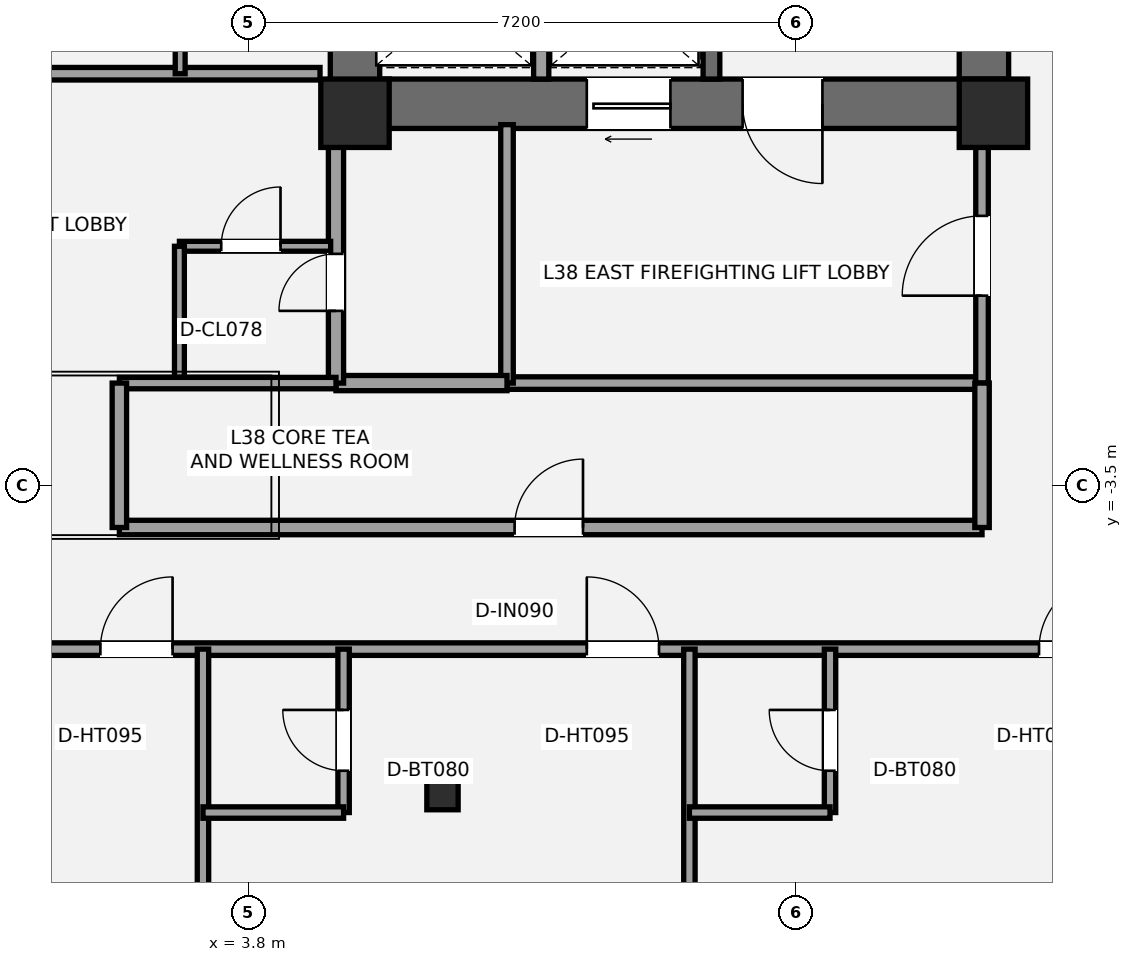
"""IFC4 building model, lengths in metres.
Left out: names, types, materials, properties, quantities, classifications, styles, units other than length and angle.
Written with IfcOpenShell. Run it as: python <this file> out.ifc"""

import sys

from ifc_helpers import new_model, si_unit, direction, frame, frame_2d, origin, origin_2d, place, context, subcontext, project, spatial, rectangle, i_section, extrude, element, fill, save


model = new_model("IFC4")
c1 = context("Model", 3, precision=1e-05, world=origin(), true_north=direction((0.0, 1.0)))
c2 = subcontext(c1, "Body", "Model", "MODEL_VIEW")
j1 = project(units=[si_unit("LENGTHUNIT", "METRE"), si_unit("PLANEANGLEUNIT", "RADIAN")], contexts=[c1])
p1 = place(None, origin())
s1 = spatial("IfcSite", under=j1, at=p1, CompositionType="ELEMENT")
p2 = place(p1, origin())
s2 = spatial("IfcBuilding", under=s1, at=p2, CompositionType="ELEMENT")
p3 = place(p2, frame((0.0, 0.0, 143.8)))
s3 = spatial("IfcBuildingStorey", under=s2, at=p3, CompositionType="ELEMENT", Elevation=143.8)
p4 = place(p3, frame((13.475, 1.2, 0.0), z_axis=(0.0, 0.0, 1.0), x_axis=(0.0, 1.0, 0.0)))
e1 = element("IfcWall", 1, at=p4, inside=s3, PredefinedType="SHEAR", context=c2, shape_type="SweptSolid", body=[
    extrude(rectangle(XDim=8.45, YDim=0.65, at=frame_2d((4.225, 0.0))), origin(), (0.0, 0.0, 1.0), 3.2),
])
p5 = place(p3, frame((13.8, 1.525, 0.0), z_axis=(0.0, 0.0, 1.0), x_axis=(-1.0, 0.0, 0.0)))
e2 = element("IfcWall", 2, at=p5, inside=s3, PredefinedType="SHEAR", context=c2, shape_type="SweptSolid", body=[
    extrude(rectangle(XDim=8.925, YDim=0.65, at=frame_2d((4.462, 0.0))), origin(), (0.0, 0.0, 1.0), 3.2),
])
p6 = place(p5, frame((2.45, 0.0, 0.0)))
e3 = element("IfcOpeningElement", 3, at=p6, cuts=e2, PredefinedType="OPENING", context=c2, shape_type="SweptSolid", body=[
    extrude(rectangle(XDim=1.05, YDim=2.15, at=frame_2d((0.525, 1.075))), frame((0.0, 0.335, 0.0), z_axis=(0.0, -1.0, 0.0), x_axis=(1.0, 0.0, 0.0)), (0.0, 0.0, 1.0), 0.67),
])
p7 = place(p5, frame((4.45, 0.0, 0.0)))
e4 = element("IfcOpeningElement", 4, at=p7, cuts=e2, PredefinedType="OPENING", context=c2, shape_type="SweptSolid", body=[
    extrude(rectangle(XDim=1.1, YDim=2.2, at=frame_2d((0.55, 1.1))), frame((0.0, 0.335, 0.0), z_axis=(0.0, -1.0, 0.0), x_axis=(1.0, 0.0, 0.0)), (0.0, 0.0, 1.0), 0.67),
])
p8 = place(p3, frame((5.2, 1.2, 0.0), z_axis=(0.0, 0.0, 1.0), x_axis=(0.0, 1.0, 0.0)))
e5 = element("IfcWall", 5, at=p8, inside=s3, PredefinedType="SHEAR", context=c2, shape_type="SweptSolid", body=[
    extrude(rectangle(XDim=2.6, YDim=0.65, at=frame_2d((1.3, 0.0))), origin(), (0.0, 0.0, 1.0), 3.2),
])
p9 = place(p3, frame((9.89, 1.85, 0.0), z_axis=(0.0, 0.0, 1.0), x_axis=(0.0, 1.0, 0.0)))
e6 = element("IfcWall", 6, at=p9, inside=s3, PredefinedType="SHEAR", context=c2, shape_type="SweptSolid", body=[
    extrude(rectangle(XDim=7.15, YDim=0.22, at=frame_2d((3.575, 0.0))), origin(), (0.0, 0.0, 1.0), 3.2),
])
for number, where, z_axis, x_axis in (
    (7, (5.2, 1.4, 0.0), (0.0, 0.0, 1.0), (1.0, 0.0, 0.0)),
    (8, (13.6, 1.4, 0.0), (0.0, 0.0, 1.0), (1.0, 0.0, 0.0)),
):
    element("IfcColumn", number, at=place(p3, frame(where, z_axis=z_axis, x_axis=x_axis)), inside=s3, PredefinedType="COLUMN", context=c2, shape_type="SweptSolid", body=[
        extrude(rectangle(XDim=0.9, YDim=0.9, at=origin_2d()), origin(), (0.0, 0.0, 1.0), 3.2),
    ])
p10 = place(p3, frame((6.351, -7.546, 0.0), z_axis=(0.0, 0.0, 1.0), x_axis=(1.0, 0.0, 0.0)))
e9 = element("IfcColumn", 9, at=p10, inside=s3, PredefinedType="COLUMN", context=c2, shape_type="SweptSolid", body=[
    extrude(i_section(OverallWidth=0.412, OverallDepth=0.435, WebThickness=0.036, FlangeThickness=0.057, at=origin_2d()), origin(), (0.0, 0.0, 1.0), 3.2),
])
p11 = place(p3, frame((7.2, -2.15, 0.0), z_axis=(0.0, 0.0, 1.0), x_axis=(1.0, 0.0, 0.0)))
e10 = element("IfcWall", 10, at=p11, inside=s3, PredefinedType="PARTITIONING", context=c2, shape_type="SweptSolid", body=[
    extrude(rectangle(XDim=6.25, YDim=0.165, at=frame_2d((3.125, 0.0))), origin(), (0.0, 0.0, 1.0), 3.02),
])
p12 = place(p3, frame((7.2, -2.15, 0.0), z_axis=(0.0, 0.0, 1.0), x_axis=(0.0, 1.0, 0.0)))
e11 = element("IfcWall", 11, at=p12, inside=s3, PredefinedType="PARTITIONING", context=c2, shape_type="SweptSolid", body=[
    extrude(rectangle(XDim=3.4, YDim=0.165, at=frame_2d((1.7, 0.0))), origin(), (0.0, 0.0, 1.0), 2.473),
])
p13 = place(p3, frame((13.45, -2.15, 0.0), z_axis=(0.0, 0.0, 1.0), x_axis=(0.0, 1.0, 0.0)))
e12 = element("IfcWall", 12, at=p13, inside=s3, PredefinedType="PARTITIONING", context=c2, shape_type="SweptSolid", body=[
    extrude(rectangle(XDim=3.4, YDim=0.165, at=frame_2d((1.7, 0.0))), origin(), (0.0, 0.0, 1.0), 2.473),
])
p14 = place(p13, frame((1.15, 0.0, 0.0)))
e13 = element("IfcOpeningElement", 13, at=p14, cuts=e12, PredefinedType="OPENING", context=c2, shape_type="SweptSolid", body=[
    extrude(rectangle(XDim=1.05, YDim=2.15, at=frame_2d((0.525, 1.075))), frame((0.0, 0.093, 0.0), z_axis=(0.0, -1.0, 0.0), x_axis=(1.0, 0.0, 0.0)), (0.0, 0.0, 1.0), 0.185),
])
p15 = place(p3, frame((4.95, -2.15, 0.0), z_axis=(0.0, 0.0, 1.0), x_axis=(1.0, 0.0, 0.0)))
e14 = element("IfcWall", 14, at=p15, inside=s3, PredefinedType="SOLIDWALL", context=c2, shape_type="SweptSolid", body=[
    extrude(rectangle(XDim=2.25, YDim=0.2, at=frame_2d((1.125, 0.0))), origin(), (0.0, 0.0, 1.0), 3.02),
])
p16 = place(p3, frame((4.95, -2.15, 0.0), z_axis=(0.0, 0.0, 1.0), x_axis=(0.0, 1.0, 0.0)))
e15 = element("IfcWall", 15, at=p16, inside=s3, PredefinedType="SOLIDWALL", context=c2, shape_type="SweptSolid", body=[
    extrude(rectangle(XDim=3.4, YDim=0.2, at=frame_2d((1.7, 0.0))), origin(), (0.0, 0.0, 1.0), 2.473),
])
p17 = place(p16, frame((0.95, 0.0, 0.0)))
e16 = element("IfcOpeningElement", 16, at=p17, cuts=e15, PredefinedType="OPENING", context=c2, shape_type="SweptSolid", body=[
    extrude(rectangle(XDim=0.75, YDim=2.1, at=frame_2d((0.375, 1.05))), frame((0.0, 0.11, 0.0), z_axis=(0.0, -1.0, 0.0), x_axis=(1.0, 0.0, 0.0)), (0.0, 0.0, 1.0), 0.22),
])
p18 = place(p3, frame((2.89, -0.35, 0.0), z_axis=(0.0, 0.0, 1.0), x_axis=(1.0, 0.0, 0.0)))
e17 = element("IfcWall", 17, at=p18, inside=s3, PredefinedType="PARTITIONING", context=c2, shape_type="SweptSolid", body=[
    extrude(rectangle(XDim=1.99, YDim=0.13, at=frame_2d((0.995, 0.0))), origin(), (0.0, 0.0, 1.0), 3.02),
])
p19 = place(p18, frame((0.55, 0.0, 0.0)))
e18 = element("IfcOpeningElement", 18, at=p19, cuts=e17, PredefinedType="OPENING", context=c2, shape_type="SweptSolid", body=[
    extrude(rectangle(XDim=0.78, YDim=2.1, at=frame_2d((0.39, 1.05))), frame((0.0, 0.075, 0.0), z_axis=(0.0, -1.0, 0.0), x_axis=(1.0, 0.0, 0.0)), (0.0, 0.0, 1.0), 0.15),
])
p20 = place(p3, frame((2.89, -2.15, 0.0), z_axis=(0.0, 0.0, 1.0), x_axis=(0.0, 1.0, 0.0)))
e19 = element("IfcWall", 19, at=p20, inside=s3, PredefinedType="PARTITIONING", context=c2, shape_type="SweptSolid", body=[
    extrude(rectangle(XDim=1.8, YDim=0.13, at=frame_2d((0.9, 0.0))), origin(), (0.0, 0.0, 1.0), 3.02),
])
p21 = place(p3, frame((7.65, 1.85, 0.0), z_axis=(0.0, 0.0, 1.0), x_axis=(0.0, 1.0, 0.0)))
e20 = element("IfcWall", 20, at=p21, inside=s3, PredefinedType="SOLIDWALL", context=c2, shape_type="SweptSolid", body=[
    extrude(rectangle(XDim=1.97, YDim=0.2, at=frame_2d((0.985, 0.0))), origin(), (0.0, 0.0, 1.0), 3.02),
])
p22 = place(p3, frame((0.85, 1.92, 0.0), z_axis=(0.0, 0.0, 1.0), x_axis=(1.0, 0.0, 0.0)))
e21 = element("IfcWall", 21, at=p22, inside=s3, PredefinedType="PARTITIONING", context=c2, shape_type="SweptSolid", body=[
    extrude(rectangle(XDim=3.89, YDim=0.165, at=frame_2d((1.945, 0.0))), origin(), (0.0, 0.0, 1.0), 2.16),
])
p23 = place(p3, frame((2.9, 1.92, 0.0), z_axis=(0.0, 0.0, 1.0), x_axis=(0.0, 1.0, 0.0)))
e22 = element("IfcWall", 22, at=p23, inside=s3, PredefinedType="PARTITIONING", context=c2, shape_type="SweptSolid", body=[
    extrude(rectangle(XDim=1.82, YDim=0.13, at=frame_2d((0.91, 0.0))), origin(), (0.0, 0.0, 1.0), 3.02),
])
p24 = place(p3, frame((2.1, -4.05, 0.0), z_axis=(0.0, 0.0, 1.0), x_axis=(1.0, 0.0, 0.0)))
e23 = element("IfcWall", 23, at=p24, inside=s3, PredefinedType="PLUMBINGWALL", context=c2, shape_type="SweptSolid", body=[
    extrude(rectangle(XDim=11.35, YDim=0.19, at=frame_2d((5.675, 0.0))), origin(), (0.0, 0.0, 1.0), 2.555),
])
p25 = place(p24, frame((5.2, 0.0, 0.0)))
e24 = element("IfcOpeningElement", 24, at=p25, cuts=e23, PredefinedType="OPENING", context=c2, shape_type="SweptSolid", body=[
    extrude(rectangle(XDim=0.9, YDim=2.1, at=frame_2d((0.45, 1.05))), frame((0.0, 0.105, 0.0), z_axis=(0.0, -1.0, 0.0), x_axis=(1.0, 0.0, 0.0)), (0.0, 0.0, 1.0), 0.21),
])
p26 = place(p3, frame((2.1, -2.15, 0.0), z_axis=(0.0, 0.0, 1.0), x_axis=(1.0, 0.0, 0.0)))
e25 = element("IfcWall", 25, at=p26, inside=s3, PredefinedType="PLUMBINGWALL", context=c2, shape_type="SweptSolid", body=[
    extrude(rectangle(XDim=2.85, YDim=0.15, at=frame_2d((1.425, 0.0))), origin(), (0.0, 0.0, 1.0), 3.02),
])
p27 = place(p3, frame((2.1, -4.05, 0.0), z_axis=(0.0, 0.0, 1.0), x_axis=(0.0, 1.0, 0.0)))
e26 = element("IfcWall", 26, at=p27, inside=s3, PredefinedType="PLUMBINGWALL", context=c2, shape_type="SweptSolid", body=[
    extrude(rectangle(XDim=1.9, YDim=0.19, at=frame_2d((0.95, 0.0))), origin(), (0.0, 0.0, 1.0), 3.02),
])
p28 = place(p3, frame((13.45, -4.05, 0.0), z_axis=(0.0, 0.0, 1.0), x_axis=(0.0, 1.0, 0.0)))
e27 = element("IfcWall", 27, at=p28, inside=s3, PredefinedType="PLUMBINGWALL", context=c2, shape_type="SweptSolid", body=[
    extrude(rectangle(XDim=1.9, YDim=0.19, at=frame_2d((0.95, 0.0))), origin(), (0.0, 0.0, 1.0), 2.473),
])
p29 = place(p3, frame((-15.55, -5.65, 0.0), z_axis=(0.0, 0.0, 1.0), x_axis=(1.0, 0.0, 0.0)))
e28 = element("IfcWall", 28, at=p29, inside=s3, PredefinedType="PARTITIONING", context=c2, shape_type="SweptSolid", body=[
    extrude(rectangle(XDim=31.1, YDim=0.165, at=frame_2d((15.55, 0.0))), origin(), (0.0, 0.0, 1.0), 2.398),
])
p30 = place(p29, frame((4.6, 0.0, 0.0)))
e29 = element("IfcOpeningElement", 29, at=p30, cuts=e28, PredefinedType="OPENING", context=c2, shape_type="SweptSolid", body=[
    extrude(rectangle(XDim=0.95, YDim=2.15, at=frame_2d((0.475, 1.075))), frame((0.0, 0.093, 0.0), z_axis=(0.0, -1.0, 0.0), x_axis=(1.0, 0.0, 0.0)), (0.0, 0.0, 1.0), 0.185),
])
p31 = place(p29, frame((11.0, 0.0, 0.0)))
e30 = element("IfcOpeningElement", 30, at=p31, cuts=e28, PredefinedType="OPENING", context=c2, shape_type="SweptSolid", body=[
    extrude(rectangle(XDim=0.95, YDim=2.15, at=frame_2d((0.475, 1.075))), frame((0.0, 0.093, 0.0), z_axis=(0.0, -1.0, 0.0), x_axis=(1.0, 0.0, 0.0)), (0.0, 0.0, 1.0), 0.185),
])
p32 = place(p29, frame((17.4, 0.0, 0.0)))
e31 = element("IfcOpeningElement", 31, at=p32, cuts=e28, PredefinedType="OPENING", context=c2, shape_type="SweptSolid", body=[
    extrude(rectangle(XDim=0.95, YDim=2.15, at=frame_2d((0.475, 1.075))), frame((0.0, 0.093, 0.0), z_axis=(0.0, -1.0, 0.0), x_axis=(1.0, 0.0, 0.0)), (0.0, 0.0, 1.0), 0.185),
])
p33 = place(p29, frame((23.8, 0.0, 0.0)))
e32 = element("IfcOpeningElement", 32, at=p33, cuts=e28, PredefinedType="OPENING", context=c2, shape_type="SweptSolid", body=[
    extrude(rectangle(XDim=0.95, YDim=2.15, at=frame_2d((0.475, 1.075))), frame((0.0, 0.093, 0.0), z_axis=(0.0, -1.0, 0.0), x_axis=(1.0, 0.0, 0.0)), (0.0, 0.0, 1.0), 0.185),
])
p34 = place(p29, frame((29.75, 0.0, 0.0)))
e33 = element("IfcOpeningElement", 33, at=p34, cuts=e28, PredefinedType="OPENING", context=c2, shape_type="SweptSolid", body=[
    extrude(rectangle(XDim=0.95, YDim=2.15, at=frame_2d((0.475, 1.075))), frame((0.0, 0.093, 0.0), z_axis=(0.0, -1.0, 0.0), x_axis=(1.0, 0.0, 0.0)), (0.0, 0.0, 1.0), 0.185),
])
p35 = place(p3, frame((3.2, -16.205, 0.0), z_axis=(0.0, 0.0, 1.0), x_axis=(0.0, 1.0, 0.0)))
e34 = element("IfcWall", 34, at=p35, inside=s3, PredefinedType="PLUMBINGWALL", context=c2, shape_type="SweptSolid", body=[
    extrude(rectangle(XDim=10.555, YDim=0.15, at=frame_2d((5.278, 0.0))), origin(), (0.0, 0.0, 1.0), 2.473),
])
p36 = place(p3, frame((9.6, -15.591, 0.0), z_axis=(0.0, 0.0, 1.0), x_axis=(0.0, 1.0, 0.0)))
e35 = element("IfcWall", 35, at=p36, inside=s3, PredefinedType="PLUMBINGWALL", context=c2, shape_type="SweptSolid", body=[
    extrude(rectangle(XDim=9.941, YDim=0.15, at=frame_2d((4.97, 0.0))), origin(), (0.0, 0.0, 1.0), 3.02),
])
p37 = place(p3, frame((5.05, -7.8, 0.0), z_axis=(0.0, 0.0, 1.0), x_axis=(0.0, 1.0, 0.0)))
e36 = element("IfcWall", 36, at=p37, inside=s3, PredefinedType="PLUMBINGWALL", context=c2, shape_type="SweptSolid", body=[
    extrude(rectangle(XDim=2.15, YDim=0.15, at=frame_2d((1.075, 0.0))), origin(), (0.0, 0.0, 1.0), 3.02),
])
p38 = place(p37, frame((0.55, 0.0, 0.0)))
e37 = element("IfcOpeningElement", 37, at=p38, cuts=e36, PredefinedType="OPENING", context=c2, shape_type="SweptSolid", body=[
    extrude(rectangle(XDim=0.8, YDim=2.1, at=frame_2d((0.4, 1.05))), frame((0.0, 0.085, 0.0), z_axis=(0.0, -1.0, 0.0), x_axis=(1.0, 0.0, 0.0)), (0.0, 0.0, 1.0), 0.17),
])
p39 = place(p3, frame((3.2, -7.8, 0.0), z_axis=(0.0, 0.0, 1.0), x_axis=(1.0, 0.0, 0.0)))
e38 = element("IfcWall", 38, at=p39, inside=s3, PredefinedType="PLUMBINGWALL", context=c2, shape_type="SweptSolid", body=[
    extrude(rectangle(XDim=1.85, YDim=0.15, at=frame_2d((0.925, 0.0))), origin(), (0.0, 0.0, 1.0), 3.02),
])
p40 = place(p3, frame((11.45, -7.8, 0.0), z_axis=(0.0, 0.0, 1.0), x_axis=(0.0, 1.0, 0.0)))
e39 = element("IfcWall", 39, at=p40, inside=s3, PredefinedType="PLUMBINGWALL", context=c2, shape_type="SweptSolid", body=[
    extrude(rectangle(XDim=2.15, YDim=0.15, at=frame_2d((1.075, 0.0))), origin(), (0.0, 0.0, 1.0), 3.02),
])
p41 = place(p40, frame((0.55, 0.0, 0.0)))
e40 = element("IfcOpeningElement", 40, at=p41, cuts=e39, PredefinedType="OPENING", context=c2, shape_type="SweptSolid", body=[
    extrude(rectangle(XDim=0.8, YDim=2.1, at=frame_2d((0.4, 1.05))), frame((0.0, 0.085, 0.0), z_axis=(0.0, -1.0, 0.0), x_axis=(1.0, 0.0, 0.0)), (0.0, 0.0, 1.0), 0.17),
])
p42 = place(p3, frame((9.6, -7.8, 0.0), z_axis=(0.0, 0.0, 1.0), x_axis=(1.0, 0.0, 0.0)))
e41 = element("IfcWall", 41, at=p42, inside=s3, PredefinedType="PLUMBINGWALL", context=c2, shape_type="SweptSolid", body=[
    extrude(rectangle(XDim=1.85, YDim=0.15, at=frame_2d((0.925, 0.0))), origin(), (0.0, 0.0, 1.0), 2.473),
])
p43 = place(p6, origin())
e42 = element("IfcDoor", 42, at=p43, inside=s3, OperationType="SINGLE_SWING_LEFT", PredefinedType="DOOR", context=c2, shape_type="SweptSolid", body=[
    extrude(rectangle(XDim=1.05, YDim=2.15, at=frame_2d((0.525, 1.075))), frame((0.0, 0.025, 0.0), z_axis=(0.0, -1.0, 0.0), x_axis=(1.0, 0.0, 0.0)), (0.0, 0.0, 1.0), 0.05),
])
fill(e3, e42)
p44 = place(p14, origin())
e43 = element("IfcDoor", 43, at=p44, inside=s3, OperationType="SINGLE_SWING_LEFT", PredefinedType="DOOR", context=c2, shape_type="SweptSolid", body=[
    extrude(rectangle(XDim=1.05, YDim=2.15, at=frame_2d((0.525, 1.075))), frame((0.0, 0.025, 0.0), z_axis=(0.0, -1.0, 0.0), x_axis=(1.0, 0.0, 0.0)), (0.0, 0.0, 1.0), 0.05),
])
fill(e13, e43)
p45 = place(p17, origin())
e44 = element("IfcDoor", 44, at=p45, inside=s3, OperationType="SINGLE_SWING_LEFT", PredefinedType="DOOR", context=c2, shape_type="SweptSolid", body=[
    extrude(rectangle(XDim=0.75, YDim=2.1, at=frame_2d((0.375, 1.05))), frame((0.0, 0.025, 0.0), z_axis=(0.0, -1.0, 0.0), x_axis=(1.0, 0.0, 0.0)), (0.0, 0.0, 1.0), 0.05),
])
fill(e16, e44)
p46 = place(p19, origin())
e45 = element("IfcDoor", 45, at=p46, inside=s3, OperationType="SINGLE_SWING_RIGHT", PredefinedType="DOOR", context=c2, shape_type="SweptSolid", body=[
    extrude(rectangle(XDim=0.78, YDim=2.1, at=frame_2d((0.39, 1.05))), frame((0.0, 0.025, 0.0), z_axis=(0.0, -1.0, 0.0), x_axis=(1.0, 0.0, 0.0)), (0.0, 0.0, 1.0), 0.05),
])
fill(e18, e45)
p47 = place(p7, origin())
e46 = element("IfcDoor", 46, at=p47, inside=s3, OperationType="SLIDING_TO_LEFT", PredefinedType="DOOR", context=c2, shape_type="SweptSolid", body=[
    extrude(rectangle(XDim=1.1, YDim=2.2, at=frame_2d((0.55, 1.1))), frame((0.0, 0.025, 0.0), z_axis=(0.0, -1.0, 0.0), x_axis=(1.0, 0.0, 0.0)), (0.0, 0.0, 1.0), 0.05),
])
fill(e4, e46)
p48 = place(p25, origin())
e47 = element("IfcDoor", 47, at=p48, inside=s3, OperationType="SINGLE_SWING_RIGHT", PredefinedType="DOOR", context=c2, shape_type="SweptSolid", body=[
    extrude(rectangle(XDim=0.9, YDim=2.1, at=frame_2d((0.45, 1.05))), frame((0.0, 0.025, 0.0), z_axis=(0.0, -1.0, 0.0), x_axis=(1.0, 0.0, 0.0)), (0.0, 0.0, 1.0), 0.05),
])
fill(e24, e47)
p49 = place(p32, origin())
e48 = element("IfcDoor", 48, at=p49, inside=s3, OperationType="SINGLE_SWING_RIGHT", PredefinedType="DOOR", context=c2, shape_type="SweptSolid", body=[
    extrude(rectangle(XDim=0.95, YDim=2.15, at=frame_2d((0.475, 1.075))), frame((0.0, 0.025, 0.0), z_axis=(0.0, -1.0, 0.0), x_axis=(1.0, 0.0, 0.0)), (0.0, 0.0, 1.0), 0.05),
])
fill(e31, e48)
p50 = place(p33, origin())
e49 = element("IfcDoor", 49, at=p50, inside=s3, OperationType="SINGLE_SWING_LEFT", PredefinedType="DOOR", context=c2, shape_type="SweptSolid", body=[
    extrude(rectangle(XDim=0.95, YDim=2.15, at=frame_2d((0.475, 1.075))), frame((0.0, 0.025, 0.0), z_axis=(0.0, -1.0, 0.0), x_axis=(1.0, 0.0, 0.0)), (0.0, 0.0, 1.0), 0.05),
])
fill(e32, e49)
p51 = place(p38, origin())
e50 = element("IfcDoor", 50, at=p51, inside=s3, OperationType="SINGLE_SWING_RIGHT", PredefinedType="DOOR", context=c2, shape_type="SweptSolid", body=[
    extrude(rectangle(XDim=0.8, YDim=2.1, at=frame_2d((0.4, 1.05))), frame((0.0, 0.025, 0.0), z_axis=(0.0, -1.0, 0.0), x_axis=(1.0, 0.0, 0.0)), (0.0, 0.0, 1.0), 0.05),
])
fill(e37, e50)
p52 = place(p34, origin())
e51 = element("IfcDoor", 51, at=p52, inside=s3, OperationType="SINGLE_SWING_RIGHT", PredefinedType="DOOR", context=c2, shape_type="SweptSolid", body=[
    extrude(rectangle(XDim=0.95, YDim=2.15, at=frame_2d((0.475, 1.075))), frame((0.0, 0.025, 0.0), z_axis=(0.0, -1.0, 0.0), x_axis=(1.0, 0.0, 0.0)), (0.0, 0.0, 1.0), 0.05),
])
fill(e33, e51)
p53 = place(p41, origin())
e52 = element("IfcDoor", 52, at=p53, inside=s3, OperationType="SINGLE_SWING_RIGHT", PredefinedType="DOOR", context=c2, shape_type="SweptSolid", body=[
    extrude(rectangle(XDim=0.8, YDim=2.1, at=frame_2d((0.4, 1.05))), frame((0.0, 0.025, 0.0), z_axis=(0.0, -1.0, 0.0), x_axis=(1.0, 0.0, 0.0)), (0.0, 0.0, 1.0), 0.05),
])
fill(e40, e52)
save(model, sys.argv[1])
